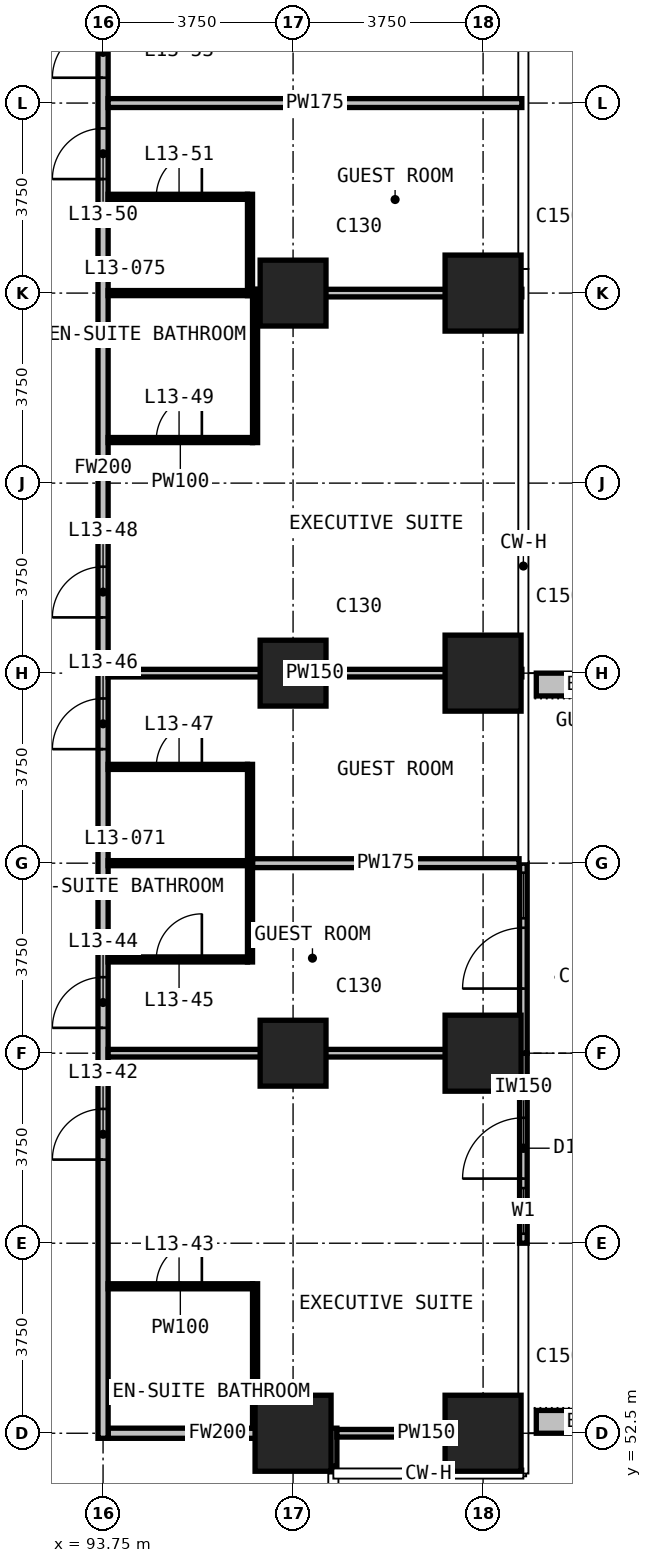
"""IFC4 building model, lengths in metres.
Left out: names, types, materials, properties, quantities, classifications, styles, units other than length and angle.
Written with IfcOpenShell. Run it as: python <this file> out.ifc"""

import sys

from ifc_helpers import new_model, si_unit, direction, frame, frame_2d, origin, origin_2d, place, context, subcontext, project, spatial, rectangle, extrude, element, fill, save


model = new_model("IFC4")
c1 = context("Model", 3, precision=1e-05, world=origin(), true_north=direction((0.0, 1.0)))
c2 = subcontext(c1, "Body", "Model", "MODEL_VIEW")
j1 = project(units=[si_unit("LENGTHUNIT", "METRE"), si_unit("PLANEANGLEUNIT", "RADIAN")], contexts=[c1])
p1 = place(None, origin())
s1 = spatial("IfcSite", under=j1, at=p1, CompositionType="ELEMENT")
p2 = place(p1, origin())
s2 = spatial("IfcBuilding", under=s1, at=p2, CompositionType="ELEMENT")
p3 = place(p2, frame((0.0, 0.0, 62.6)))
s3 = spatial("IfcBuildingStorey", under=s2, at=p3, CompositionType="ELEMENT", Elevation=62.6)
p4 = place(p3, frame((97.5, 52.5, 0.0), z_axis=(0.0, 0.0, 1.0), x_axis=(1.0, 0.0, 0.0)))
e1 = element("IfcColumn", 1, at=p4, inside=s3, PredefinedType="COLUMN", context=c2, shape_type="SweptSolid", body=[
    extrude(rectangle(XDim=1.5, YDim=1.5, at=origin_2d()), origin(), (0.0, 0.0, 1.0), 3.3),
])
for number, where, z_axis, x_axis in (
    (2, (97.5, 60.0, 0.0), (0.0, 0.0, 1.0), (1.0, 0.0, 0.0)),
    (3, (97.5, 67.5, 0.0), (0.0, 0.0, 1.0), (1.0, 0.0, 0.0)),
    (4, (97.5, 75.0, 0.0), (0.0, 0.0, 1.0), (1.0, 0.0, 0.0)),
):
    element("IfcColumn", number, at=place(p3, frame(where, z_axis=z_axis, x_axis=x_axis)), inside=s3, PredefinedType="COLUMN", context=c2, shape_type="SweptSolid", body=[
        extrude(rectangle(XDim=1.3, YDim=1.3, at=origin_2d()), origin(), (0.0, 0.0, 1.0), 3.3),
    ])
for number, where, z_axis, x_axis in (
    (5, (101.25, 52.5, 0.0), (0.0, 0.0, 1.0), (1.0, 0.0, 0.0)),
    (6, (101.25, 60.0, 0.0), (0.0, 0.0, 1.0), (1.0, 0.0, 0.0)),
    (7, (101.25, 67.5, 0.0), (0.0, 0.0, 1.0), (1.0, 0.0, 0.0)),
    (8, (101.25, 75.0, 0.0), (0.0, 0.0, 1.0), (1.0, 0.0, 0.0)),
):
    element("IfcColumn", number, at=place(p3, frame(where, z_axis=z_axis, x_axis=x_axis)), inside=s3, PredefinedType="COLUMN", context=c2, shape_type="SweptSolid", body=[
        extrude(rectangle(XDim=1.5, YDim=1.5, at=origin_2d()), origin(), (0.0, 0.0, 1.0), 3.3),
    ])
p5 = place(p3, frame((102.045, 56.25, 0.0), z_axis=(0.0, 0.0, 1.0), x_axis=(0.0, 1.0, 0.0)))
e9 = element("IfcWall", 9, at=p5, inside=s3, PredefinedType="SOLIDWALL", context=c2, shape_type="SweptSolid", body=[
    extrude(rectangle(XDim=3.75, YDim=0.15, at=frame_2d((1.875, 0.0))), origin(), (0.0, 0.0, 1.0), 3.0),
])
p6 = place(p5, frame((0.188, 0.0, 0.1)))
e10 = element("IfcOpeningElement", 10, at=p6, cuts=e9, PredefinedType="OPENING", context=c2, shape_type="SweptSolid", body=[
    extrude(rectangle(XDim=0.9, YDim=2.4, at=frame_2d((0.45, 1.2))), frame((0.0, 0.085, 0.0), z_axis=(0.0, -1.0, 0.0), x_axis=(1.0, 0.0, 0.0)), (0.0, 0.0, 1.0), 0.17),
])
p7 = place(p5, frame((1.275, 0.0, 0.0)))
e11 = element("IfcOpeningElement", 11, at=p7, cuts=e9, PredefinedType="OPENING", context=c2, shape_type="SweptSolid", body=[
    extrude(rectangle(XDim=1.2, YDim=2.4, at=frame_2d((0.6, 1.2))), frame((0.0, 0.085, 0.0), z_axis=(0.0, -1.0, 0.0), x_axis=(1.0, 0.0, 0.0)), (0.0, 0.0, 1.0), 0.17),
])
p8 = place(p3, frame((102.045, 60.0, 0.0), z_axis=(0.0, 0.0, 1.0), x_axis=(0.0, 1.0, 0.0)))
e12 = element("IfcWall", 12, at=p8, inside=s3, PredefinedType="SOLIDWALL", context=c2, shape_type="SweptSolid", body=[
    extrude(rectangle(XDim=3.75, YDim=0.15, at=frame_2d((1.875, 0.0))), origin(), (0.0, 0.0, 1.0), 3.0),
])
p9 = place(p8, frame((1.275, 0.0, 0.0)))
e13 = element("IfcOpeningElement", 13, at=p9, cuts=e12, PredefinedType="OPENING", context=c2, shape_type="SweptSolid", body=[
    extrude(rectangle(XDim=1.2, YDim=2.4, at=frame_2d((0.6, 1.2))), frame((0.0, 0.085, 0.0), z_axis=(0.0, -1.0, 0.0), x_axis=(1.0, 0.0, 0.0)), (0.0, 0.0, 1.0), 0.17),
])
p10 = place(p8, frame((2.663, 0.0, 0.1)))
e14 = element("IfcOpeningElement", 14, at=p10, cuts=e12, PredefinedType="OPENING", context=c2, shape_type="SweptSolid", body=[
    extrude(rectangle(XDim=0.9, YDim=2.4, at=frame_2d((0.45, 1.2))), frame((0.0, 0.085, 0.0), z_axis=(0.0, -1.0, 0.0), x_axis=(1.0, 0.0, 0.0)), (0.0, 0.0, 1.0), 0.17),
])
for number, where, z_axis, x_axis in (
    (15, (102.3, 52.725, 0.0), (0.0, 0.0, 1.0), (1.0, 0.0, 0.0)),
    (16, (102.3, 67.275, 0.0), (0.0, 0.0, 1.0), (1.0, 0.0, 0.0)),
):
    element("IfcWall", number, at=place(p3, frame(where, z_axis=z_axis, x_axis=x_axis)), inside=s3, PredefinedType="USERDEFINED", context=c2, shape_type="SweptSolid", body=[
        extrude(rectangle(XDim=2.35, YDim=0.45, at=frame_2d((1.175, 0.0))), origin(), (0.0, 0.0, 1.0), 1.1),
    ])
p11 = place(p3, frame((93.85, 52.5, 0.0), z_axis=(0.0, 0.0, 1.0), x_axis=(1.0, 0.0, 0.0)))
e17 = element("IfcWall", 17, at=p11, inside=s3, PredefinedType="PARTITIONING", context=c2, shape_type="SweptSolid", body=[
    extrude(rectangle(XDim=4.315, YDim=0.2, at=frame_2d((2.157, 0.0))), origin(), (0.0, 0.0, 1.0), 3.0),
])
p12 = place(p3, frame((93.75, 52.4, 0.0), z_axis=(0.0, 0.0, 1.0), x_axis=(0.0, 1.0, 0.0)))
e18 = element("IfcWall", 18, at=p12, inside=s3, PredefinedType="PARTITIONING", context=c2, shape_type="SweptSolid", body=[
    extrude(rectangle(XDim=38.31, YDim=0.2, at=frame_2d((19.155, 0.0))), origin(), (0.0, 0.0, 1.0), 3.0),
])
p13 = place(p12, frame((5.5, 0.0, 0.0)))
e19 = element("IfcOpeningElement", 19, at=p13, cuts=e18, PredefinedType="OPENING", context=c2, shape_type="SweptSolid", body=[
    extrude(rectangle(XDim=1.0, YDim=2.2, at=frame_2d((0.5, 1.1))), frame((0.0, 0.11, 0.0), z_axis=(0.0, -1.0, 0.0), x_axis=(1.0, 0.0, 0.0)), (0.0, 0.0, 1.0), 0.22),
])
p14 = place(p12, frame((8.1, 0.0, 0.0)))
e20 = element("IfcOpeningElement", 20, at=p14, cuts=e18, PredefinedType="OPENING", context=c2, shape_type="SweptSolid", body=[
    extrude(rectangle(XDim=1.0, YDim=2.2, at=frame_2d((0.5, 1.1))), frame((0.0, 0.11, 0.0), z_axis=(0.0, -1.0, 0.0), x_axis=(1.0, 0.0, 0.0)), (0.0, 0.0, 1.0), 0.22),
])
p15 = place(p12, frame((13.6, 0.0, 0.0)))
e21 = element("IfcOpeningElement", 21, at=p15, cuts=e18, PredefinedType="OPENING", context=c2, shape_type="SweptSolid", body=[
    extrude(rectangle(XDim=1.0, YDim=2.2, at=frame_2d((0.5, 1.1))), frame((0.0, 0.11, 0.0), z_axis=(0.0, -1.0, 0.0), x_axis=(1.0, 0.0, 0.0)), (0.0, 0.0, 1.0), 0.22),
])
p16 = place(p12, frame((16.2, 0.0, 0.0)))
e22 = element("IfcOpeningElement", 22, at=p16, cuts=e18, PredefinedType="OPENING", context=c2, shape_type="SweptSolid", body=[
    extrude(rectangle(XDim=1.0, YDim=2.2, at=frame_2d((0.5, 1.1))), frame((0.0, 0.11, 0.0), z_axis=(0.0, -1.0, 0.0), x_axis=(1.0, 0.0, 0.0)), (0.0, 0.0, 1.0), 0.22),
])
p17 = place(p12, frame((24.85, 0.0, 0.0)))
e23 = element("IfcOpeningElement", 23, at=p17, cuts=e18, PredefinedType="OPENING", context=c2, shape_type="SweptSolid", body=[
    extrude(rectangle(XDim=1.0, YDim=2.2, at=frame_2d((0.5, 1.1))), frame((0.0, 0.11, 0.0), z_axis=(0.0, -1.0, 0.0), x_axis=(1.0, 0.0, 0.0)), (0.0, 0.0, 1.0), 0.22),
])
p18 = place(p12, frame((26.85, 0.0, 0.0)))
e24 = element("IfcOpeningElement", 24, at=p18, cuts=e18, PredefinedType="OPENING", context=c2, shape_type="SweptSolid", body=[
    extrude(rectangle(XDim=1.0, YDim=2.2, at=frame_2d((0.5, 1.1))), frame((0.0, 0.11, 0.0), z_axis=(0.0, -1.0, 0.0), x_axis=(1.0, 0.0, 0.0)), (0.0, 0.0, 1.0), 0.22),
])
p19 = place(p12, frame((31.55, 0.0, 0.0)))
e25 = element("IfcOpeningElement", 25, at=p19, cuts=e18, PredefinedType="OPENING", context=c2, shape_type="SweptSolid", body=[
    extrude(rectangle(XDim=0.9, YDim=2.2, at=frame_2d((0.45, 1.1))), frame((0.0, 0.11, 0.0), z_axis=(0.0, -1.0, 0.0), x_axis=(1.0, 0.0, 0.0)), (0.0, 0.0, 1.0), 0.22),
])
p20 = place(p12, frame((35.65, 0.0, 0.0)))
e26 = element("IfcOpeningElement", 26, at=p20, cuts=e18, PredefinedType="OPENING", context=c2, shape_type="SweptSolid", body=[
    extrude(rectangle(XDim=0.9, YDim=2.2, at=frame_2d((0.45, 1.1))), frame((0.0, 0.11, 0.0), z_axis=(0.0, -1.0, 0.0), x_axis=(1.0, 0.0, 0.0)), (0.0, 0.0, 1.0), 0.22),
])
p21 = place(p3, frame((98.265, 51.855, 0.0), z_axis=(0.0, 0.0, 1.0), x_axis=(0.0, 1.0, 0.0)))
e27 = element("IfcWall", 27, at=p21, inside=s3, PredefinedType="PARTITIONING", context=c2, shape_type="SweptSolid", body=[
    extrude(rectangle(XDim=0.745, YDim=0.2, at=frame_2d((0.373, 0.0))), origin(), (0.0, 0.0, 1.0), 3.0),
])
p22 = place(p3, frame((96.7, 63.75, 0.0), z_axis=(0.0, 0.0, 1.0), x_axis=(1.0, 0.0, 0.0)))
e28 = element("IfcWall", 28, at=p22, inside=s3, PredefinedType="PARTITIONING", context=c2, shape_type="SweptSolid", body=[
    extrude(rectangle(XDim=5.26, YDim=0.175, at=frame_2d((2.63, 0.0))), origin(), (0.0, 0.0, 1.0), 3.0),
])
p23 = place(p3, frame((93.85, 78.75, 0.0), z_axis=(0.0, 0.0, 1.0), x_axis=(1.0, 0.0, 0.0)))
e29 = element("IfcWall", 29, at=p23, inside=s3, PredefinedType="PARTITIONING", context=c2, shape_type="SweptSolid", body=[
    extrude(rectangle(XDim=8.165, YDim=0.175, at=frame_2d((4.083, 0.0))), origin(), (0.0, 0.0, 1.0), 3.0),
])
p24 = place(p3, frame((98.365, 52.5, 0.0), z_axis=(0.0, 0.0, 1.0), x_axis=(1.0, 0.0, 0.0)))
e30 = element("IfcWall", 30, at=p24, inside=s3, PredefinedType="PARTITIONING", context=c2, shape_type="SweptSolid", body=[
    extrude(rectangle(XDim=3.53, YDim=0.15, at=frame_2d((1.765, 0.0))), origin(), (0.0, 0.0, 1.0), 3.0),
])
p25 = place(p3, frame((93.85, 60.0, 0.0), z_axis=(0.0, 0.0, 1.0), x_axis=(1.0, 0.0, 0.0)))
e31 = element("IfcWall", 31, at=p25, inside=s3, PredefinedType="PARTITIONING", context=c2, shape_type="SweptSolid", body=[
    extrude(rectangle(XDim=8.11, YDim=0.15, at=frame_2d((4.055, 0.0))), origin(), (0.0, 0.0, 1.0), 3.0),
])
p26 = place(p3, frame((93.85, 67.5, 0.0), z_axis=(0.0, 0.0, 1.0), x_axis=(1.0, 0.0, 0.0)))
e32 = element("IfcWall", 32, at=p26, inside=s3, PredefinedType="PARTITIONING", context=c2, shape_type="SweptSolid", body=[
    extrude(rectangle(XDim=8.165, YDim=0.15, at=frame_2d((4.083, 0.0))), origin(), (0.0, 0.0, 1.0), 3.0),
])
p27 = place(p3, frame((96.8, 75.0, 0.0), z_axis=(0.0, 0.0, 1.0), x_axis=(1.0, 0.0, 0.0)))
e33 = element("IfcWall", 33, at=p27, inside=s3, PredefinedType="PARTITIONING", context=c2, shape_type="SweptSolid", body=[
    extrude(rectangle(XDim=5.215, YDim=0.15, at=frame_2d((2.607, 0.0))), origin(), (0.0, 0.0, 1.0), 3.0),
])
p28 = place(p3, frame((93.85, 55.4, 0.0), z_axis=(0.0, 0.0, 1.0), x_axis=(1.0, 0.0, 0.0)))
e34 = element("IfcWall", 34, at=p28, inside=s3, PredefinedType="PARTITIONING", context=c2, shape_type="SweptSolid", body=[
    extrude(rectangle(XDim=2.85, YDim=0.1, at=frame_2d((1.425, 0.0))), origin(), (0.0, 0.0, 1.0), 3.0),
])
p29 = place(p28, frame((0.95, 0.0, 0.0)))
e35 = element("IfcOpeningElement", 35, at=p29, cuts=e34, PredefinedType="OPENING", context=c2, shape_type="SweptSolid", body=[
    extrude(rectangle(XDim=0.9, YDim=2.2, at=frame_2d((0.45, 1.1))), frame((0.0, 0.06, 0.0), z_axis=(0.0, -1.0, 0.0), x_axis=(1.0, 0.0, 0.0)), (0.0, 0.0, 1.0), 0.12),
])
p30 = place(p3, frame((93.85, 61.85, 0.0), z_axis=(0.0, 0.0, 1.0), x_axis=(1.0, 0.0, 0.0)))
e36 = element("IfcWall", 36, at=p30, inside=s3, PredefinedType="PARTITIONING", context=c2, shape_type="SweptSolid", body=[
    extrude(rectangle(XDim=2.75, YDim=0.1, at=frame_2d((1.375, 0.0))), origin(), (0.0, 0.0, 1.0), 3.0),
])
p31 = place(p30, frame((0.95, 0.0, 0.0)))
e37 = element("IfcOpeningElement", 37, at=p31, cuts=e36, PredefinedType="OPENING", context=c2, shape_type="SweptSolid", body=[
    extrude(rectangle(XDim=0.9, YDim=2.2, at=frame_2d((0.45, 1.1))), frame((0.0, 0.06, 0.0), z_axis=(0.0, -1.0, 0.0), x_axis=(1.0, 0.0, 0.0)), (0.0, 0.0, 1.0), 0.12),
])
p32 = place(p3, frame((93.85, 63.75, 0.0), z_axis=(0.0, 0.0, 1.0), x_axis=(1.0, 0.0, 0.0)))
e38 = element("IfcWall", 38, at=p32, inside=s3, PredefinedType="PARTITIONING", context=c2, shape_type="SweptSolid", body=[
    extrude(rectangle(XDim=2.75, YDim=0.1, at=frame_2d((1.375, 0.0))), origin(), (0.0, 0.0, 1.0), 3.0),
])
p33 = place(p3, frame((93.85, 65.65, 0.0), z_axis=(0.0, 0.0, 1.0), x_axis=(1.0, 0.0, 0.0)))
e39 = element("IfcWall", 39, at=p33, inside=s3, PredefinedType="PARTITIONING", context=c2, shape_type="SweptSolid", body=[
    extrude(rectangle(XDim=2.75, YDim=0.1, at=frame_2d((1.375, 0.0))), origin(), (0.0, 0.0, 1.0), 3.0),
])
p34 = place(p33, frame((0.95, 0.0, 0.0)))
e40 = element("IfcOpeningElement", 40, at=p34, cuts=e39, PredefinedType="OPENING", context=c2, shape_type="SweptSolid", body=[
    extrude(rectangle(XDim=0.9, YDim=2.2, at=frame_2d((0.45, 1.1))), frame((0.0, 0.06, 0.0), z_axis=(0.0, -1.0, 0.0), x_axis=(1.0, 0.0, 0.0)), (0.0, 0.0, 1.0), 0.12),
])
p35 = place(p3, frame((93.85, 72.1, 0.0), z_axis=(0.0, 0.0, 1.0), x_axis=(1.0, 0.0, 0.0)))
e41 = element("IfcWall", 41, at=p35, inside=s3, PredefinedType="PARTITIONING", context=c2, shape_type="SweptSolid", body=[
    extrude(rectangle(XDim=2.85, YDim=0.1, at=frame_2d((1.425, 0.0))), origin(), (0.0, 0.0, 1.0), 3.0),
])
p36 = place(p35, frame((0.95, 0.0, 0.0)))
e42 = element("IfcOpeningElement", 42, at=p36, cuts=e41, PredefinedType="OPENING", context=c2, shape_type="SweptSolid", body=[
    extrude(rectangle(XDim=0.9, YDim=2.2, at=frame_2d((0.45, 1.1))), frame((0.0, 0.06, 0.0), z_axis=(0.0, -1.0, 0.0), x_axis=(1.0, 0.0, 0.0)), (0.0, 0.0, 1.0), 0.12),
])
p37 = place(p3, frame((93.85, 75.0, 0.0), z_axis=(0.0, 0.0, 1.0), x_axis=(1.0, 0.0, 0.0)))
e43 = element("IfcWall", 43, at=p37, inside=s3, PredefinedType="PARTITIONING", context=c2, shape_type="SweptSolid", body=[
    extrude(rectangle(XDim=2.75, YDim=0.1, at=frame_2d((1.375, 0.0))), origin(), (0.0, 0.0, 1.0), 3.0),
])
p38 = place(p3, frame((93.85, 76.9, 0.0), z_axis=(0.0, 0.0, 1.0), x_axis=(1.0, 0.0, 0.0)))
e44 = element("IfcWall", 44, at=p38, inside=s3, PredefinedType="PARTITIONING", context=c2, shape_type="SweptSolid", body=[
    extrude(rectangle(XDim=2.75, YDim=0.1, at=frame_2d((1.375, 0.0))), origin(), (0.0, 0.0, 1.0), 3.0),
])
p39 = place(p38, frame((0.95, 0.0, 0.0)))
e45 = element("IfcOpeningElement", 45, at=p39, cuts=e44, PredefinedType="OPENING", context=c2, shape_type="SweptSolid", body=[
    extrude(rectangle(XDim=0.9, YDim=2.2, at=frame_2d((0.45, 1.1))), frame((0.0, 0.06, 0.0), z_axis=(0.0, -1.0, 0.0), x_axis=(1.0, 0.0, 0.0)), (0.0, 0.0, 1.0), 0.12),
])
p40 = place(p3, frame((96.65, 61.8, 0.0), z_axis=(0.0, 0.0, 1.0), x_axis=(0.0, 1.0, 0.0)))
e46 = element("IfcWall", 46, at=p40, inside=s3, PredefinedType="PARTITIONING", context=c2, shape_type="SweptSolid", body=[
    extrude(rectangle(XDim=3.9, YDim=0.1, at=frame_2d((1.95, 0.0))), origin(), (0.0, 0.0, 1.0), 3.0),
])
p41 = place(p3, frame((96.65, 74.95, 0.0), z_axis=(0.0, 0.0, 1.0), x_axis=(0.0, 1.0, 0.0)))
e47 = element("IfcWall", 47, at=p41, inside=s3, PredefinedType="PARTITIONING", context=c2, shape_type="SweptSolid", body=[
    extrude(rectangle(XDim=2.0, YDim=0.1, at=frame_2d((1.0, 0.0))), origin(), (0.0, 0.0, 1.0), 3.0),
])
p42 = place(p3, frame((96.75, 52.6, 0.0), z_axis=(0.0, 0.0, 1.0), x_axis=(0.0, 1.0, 0.0)))
e48 = element("IfcWall", 48, at=p42, inside=s3, PredefinedType="PARTITIONING", context=c2, shape_type="SweptSolid", body=[
    extrude(rectangle(XDim=2.85, YDim=0.1, at=frame_2d((1.425, 0.0))), origin(), (0.0, 0.0, 1.0), 3.0),
])
p43 = place(p3, frame((96.75, 72.05, 0.0), z_axis=(0.0, 0.0, 1.0), x_axis=(0.0, 1.0, 0.0)))
e49 = element("IfcWall", 49, at=p43, inside=s3, PredefinedType="PARTITIONING", context=c2, shape_type="SweptSolid", body=[
    extrude(rectangle(XDim=3.025, YDim=0.1, at=frame_2d((1.512, 0.0))), origin(), (0.0, 0.0, 1.0), 3.0),
])
p44 = place(p6, origin())
e50 = element("IfcWindow", 50, at=p44, inside=s3, PartitioningType="SINGLE_PANEL", PredefinedType="WINDOW", context=c2, shape_type="SweptSolid", body=[
    extrude(rectangle(XDim=0.9, YDim=2.4, at=frame_2d((0.45, 1.2))), frame((0.0, 0.03, 0.0), z_axis=(0.0, -1.0, 0.0), x_axis=(1.0, 0.0, 0.0)), (0.0, 0.0, 1.0), 0.06),
])
fill(e10, e50)
p45 = place(p7, origin())
e51 = element("IfcDoor", 51, at=p45, inside=s3, OperationType="SINGLE_SWING_LEFT", PredefinedType="DOOR", context=c2, shape_type="SweptSolid", body=[
    extrude(rectangle(XDim=1.2, YDim=2.4, at=frame_2d((0.6, 1.2))), frame((0.0, 0.025, 0.0), z_axis=(0.0, -1.0, 0.0), x_axis=(1.0, 0.0, 0.0)), (0.0, 0.0, 1.0), 0.05),
])
fill(e11, e51)
p46 = place(p9, origin())
e52 = element("IfcDoor", 52, at=p46, inside=s3, OperationType="SINGLE_SWING_LEFT", PredefinedType="DOOR", context=c2, shape_type="SweptSolid", body=[
    extrude(rectangle(XDim=1.2, YDim=2.4, at=frame_2d((0.6, 1.2))), frame((0.0, 0.025, 0.0), z_axis=(0.0, -1.0, 0.0), x_axis=(1.0, 0.0, 0.0)), (0.0, 0.0, 1.0), 0.05),
])
fill(e13, e52)
p47 = place(p10, origin())
e53 = element("IfcWindow", 53, at=p47, inside=s3, PartitioningType="SINGLE_PANEL", PredefinedType="WINDOW", context=c2, shape_type="SweptSolid", body=[
    extrude(rectangle(XDim=0.9, YDim=2.4, at=frame_2d((0.45, 1.2))), frame((0.0, 0.03, 0.0), z_axis=(0.0, -1.0, 0.0), x_axis=(1.0, 0.0, 0.0)), (0.0, 0.0, 1.0), 0.06),
])
fill(e14, e53)
p48 = place(p13, origin())
e54 = element("IfcDoor", 54, at=p48, inside=s3, OperationType="SINGLE_SWING_LEFT", PredefinedType="DOOR", context=c2, shape_type="SweptSolid", body=[
    extrude(rectangle(XDim=1.0, YDim=2.2, at=frame_2d((0.5, 1.1))), frame((0.0, 0.025, 0.0), z_axis=(0.0, -1.0, 0.0), x_axis=(1.0, 0.0, 0.0)), (0.0, 0.0, 1.0), 0.05),
])
fill(e19, e54)
p49 = place(p29, origin())
e55 = element("IfcDoor", 55, at=p49, inside=s3, OperationType="SINGLE_SWING_RIGHT", PredefinedType="DOOR", context=c2, shape_type="SweptSolid", body=[
    extrude(rectangle(XDim=0.9, YDim=2.2, at=frame_2d((0.45, 1.1))), frame((0.0, 0.025, 0.0), z_axis=(0.0, -1.0, 0.0), x_axis=(1.0, 0.0, 0.0)), (0.0, 0.0, 1.0), 0.05),
])
fill(e35, e55)
p50 = place(p14, origin())
e56 = element("IfcDoor", 56, at=p50, inside=s3, OperationType="SINGLE_SWING_LEFT", PredefinedType="DOOR", context=c2, shape_type="SweptSolid", body=[
    extrude(rectangle(XDim=1.0, YDim=2.2, at=frame_2d((0.5, 1.1))), frame((0.0, 0.025, 0.0), z_axis=(0.0, -1.0, 0.0), x_axis=(1.0, 0.0, 0.0)), (0.0, 0.0, 1.0), 0.05),
])
fill(e20, e56)
p51 = place(p31, origin())
e57 = element("IfcDoor", 57, at=p51, inside=s3, OperationType="SINGLE_SWING_RIGHT", PredefinedType="DOOR", context=c2, shape_type="SweptSolid", body=[
    extrude(rectangle(XDim=0.9, YDim=2.2, at=frame_2d((0.45, 1.1))), frame((0.0, 0.025, 0.0), z_axis=(0.0, -1.0, 0.0), x_axis=(1.0, 0.0, 0.0)), (0.0, 0.0, 1.0), 0.05),
])
fill(e37, e57)
p52 = place(p15, origin())
e58 = element("IfcDoor", 58, at=p52, inside=s3, OperationType="SINGLE_SWING_LEFT", PredefinedType="DOOR", context=c2, shape_type="SweptSolid", body=[
    extrude(rectangle(XDim=1.0, YDim=2.2, at=frame_2d((0.5, 1.1))), frame((0.0, 0.025, 0.0), z_axis=(0.0, -1.0, 0.0), x_axis=(1.0, 0.0, 0.0)), (0.0, 0.0, 1.0), 0.05),
])
fill(e21, e58)
p53 = place(p34, origin())
e59 = element("IfcDoor", 59, at=p53, inside=s3, OperationType="SINGLE_SWING_RIGHT", PredefinedType="DOOR", context=c2, shape_type="SweptSolid", body=[
    extrude(rectangle(XDim=0.9, YDim=2.2, at=frame_2d((0.45, 1.1))), frame((0.0, 0.025, 0.0), z_axis=(0.0, -1.0, 0.0), x_axis=(1.0, 0.0, 0.0)), (0.0, 0.0, 1.0), 0.05),
])
fill(e40, e59)
p54 = place(p16, origin())
e60 = element("IfcDoor", 60, at=p54, inside=s3, OperationType="SINGLE_SWING_LEFT", PredefinedType="DOOR", context=c2, shape_type="SweptSolid", body=[
    extrude(rectangle(XDim=1.0, YDim=2.2, at=frame_2d((0.5, 1.1))), frame((0.0, 0.025, 0.0), z_axis=(0.0, -1.0, 0.0), x_axis=(1.0, 0.0, 0.0)), (0.0, 0.0, 1.0), 0.05),
])
fill(e22, e60)
p55 = place(p36, origin())
e61 = element("IfcDoor", 61, at=p55, inside=s3, OperationType="SINGLE_SWING_RIGHT", PredefinedType="DOOR", context=c2, shape_type="SweptSolid", body=[
    extrude(rectangle(XDim=0.9, YDim=2.2, at=frame_2d((0.45, 1.1))), frame((0.0, 0.025, 0.0), z_axis=(0.0, -1.0, 0.0), x_axis=(1.0, 0.0, 0.0)), (0.0, 0.0, 1.0), 0.05),
])
fill(e42, e61)
p56 = place(p17, origin())
e62 = element("IfcDoor", 62, at=p56, inside=s3, OperationType="SINGLE_SWING_LEFT", PredefinedType="DOOR", context=c2, shape_type="SweptSolid", body=[
    extrude(rectangle(XDim=1.0, YDim=2.2, at=frame_2d((0.5, 1.1))), frame((0.0, 0.025, 0.0), z_axis=(0.0, -1.0, 0.0), x_axis=(1.0, 0.0, 0.0)), (0.0, 0.0, 1.0), 0.05),
])
fill(e23, e62)
p57 = place(p39, origin())
e63 = element("IfcDoor", 63, at=p57, inside=s3, OperationType="SINGLE_SWING_RIGHT", PredefinedType="DOOR", context=c2, shape_type="SweptSolid", body=[
    extrude(rectangle(XDim=0.9, YDim=2.2, at=frame_2d((0.45, 1.1))), frame((0.0, 0.025, 0.0), z_axis=(0.0, -1.0, 0.0), x_axis=(1.0, 0.0, 0.0)), (0.0, 0.0, 1.0), 0.05),
])
fill(e45, e63)
p58 = place(p18, origin())
e64 = element("IfcDoor", 64, at=p58, inside=s3, OperationType="SINGLE_SWING_RIGHT", PredefinedType="DOOR", context=c2, shape_type="SweptSolid", body=[
    extrude(rectangle(XDim=1.0, YDim=2.2, at=frame_2d((0.5, 1.1))), frame((0.0, 0.025, 0.0), z_axis=(0.0, -1.0, 0.0), x_axis=(1.0, 0.0, 0.0)), (0.0, 0.0, 1.0), 0.05),
])
fill(e24, e64)
save(model, sys.argv[1])
